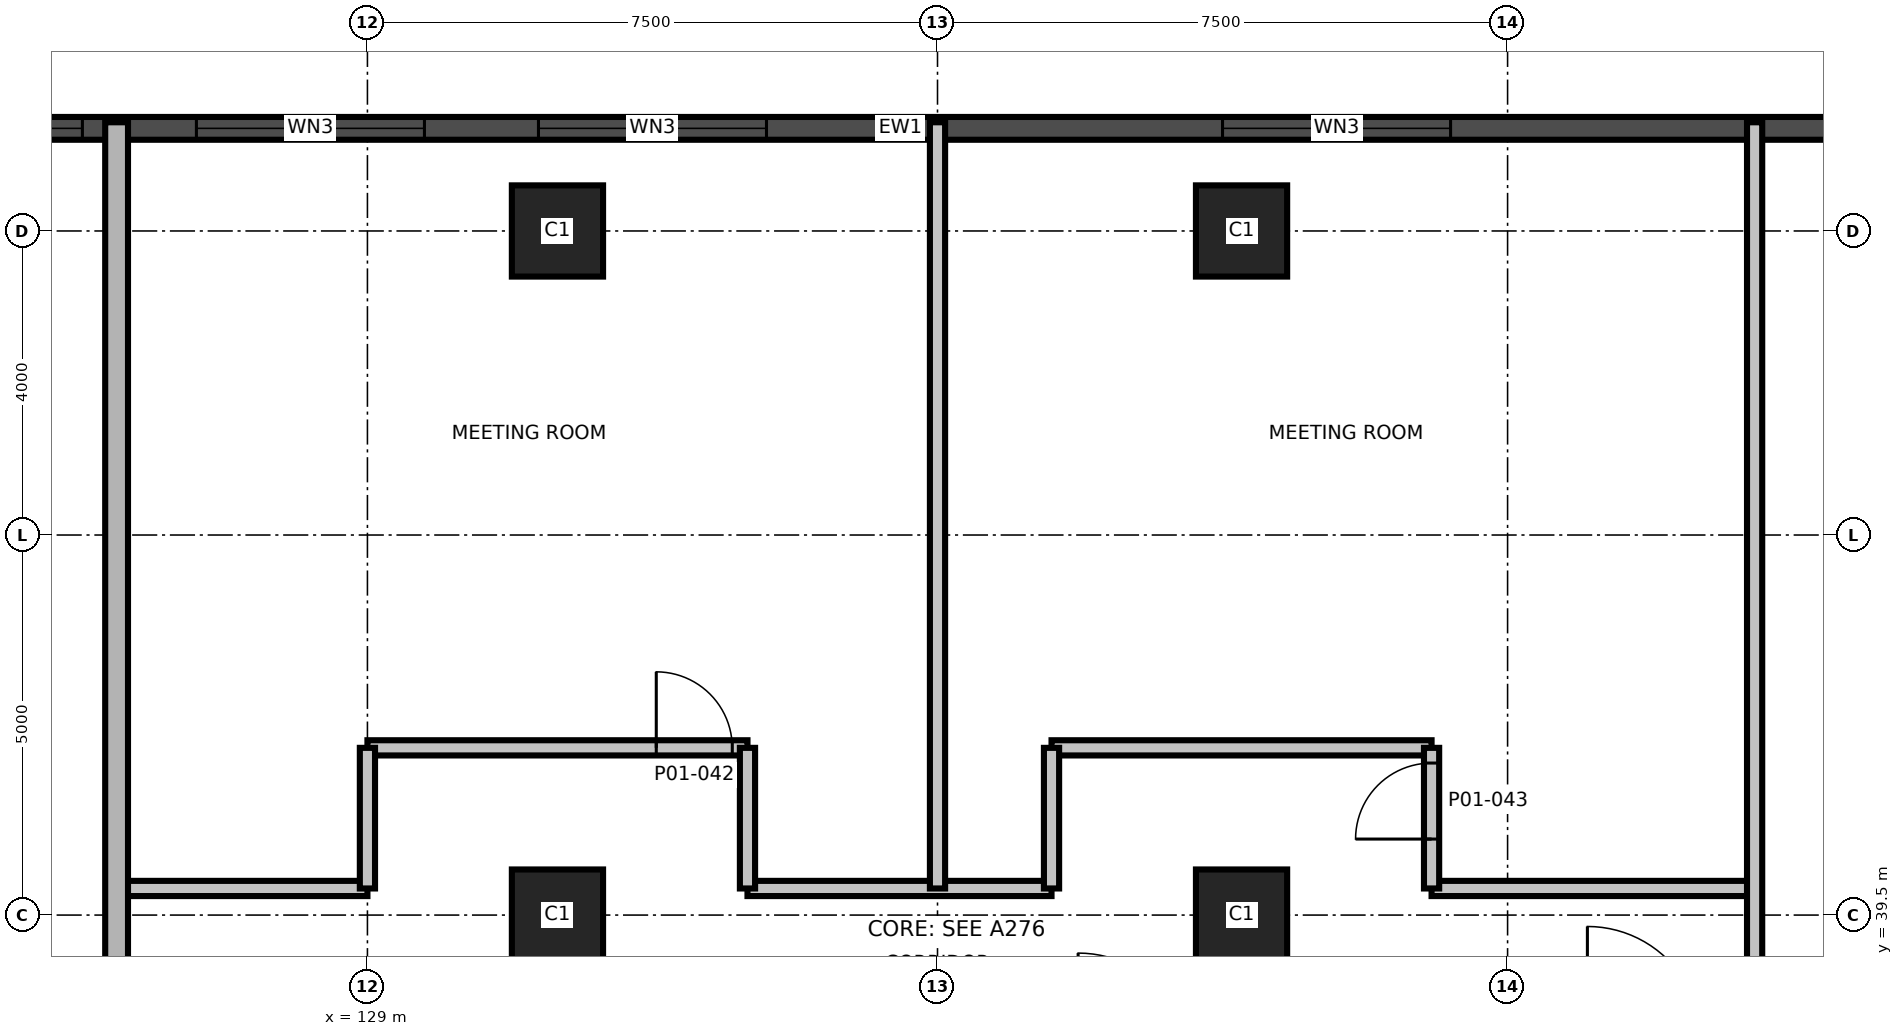
"""IFC4 building model, lengths in metres.
Left out: names, types, materials, properties, quantities, classifications, styles, units other than length and angle.
Written with IfcOpenShell. Run it as: python <this file> out.ifc"""

import sys

from ifc_helpers import new_model, si_unit, direction, frame, frame_2d, origin, origin_2d, place, context, subcontext, project, spatial, rectangle, extrude, element, fill, save


model = new_model("IFC4")
c1 = context("Model", 3, precision=1e-05, world=origin(), true_north=direction((0.0, 1.0)))
c2 = subcontext(c1, "Body", "Model", "MODEL_VIEW")
j1 = project(units=[si_unit("LENGTHUNIT", "METRE"), si_unit("PLANEANGLEUNIT", "RADIAN")], contexts=[c1])
p1 = place(None, origin())
s1 = spatial("IfcSite", under=j1, at=p1, CompositionType="ELEMENT")
p2 = place(p1, origin())
s2 = spatial("IfcBuilding", under=s1, at=p2, CompositionType="ELEMENT")
p3 = place(p2, frame((0.0, 0.0, 8.0)))
s3 = spatial("IfcBuildingStorey", under=s2, at=p3, CompositionType="ELEMENT", Elevation=8.0)
for number, where, z_axis, x_axis in (
    (1, (131.5, 39.5, 0.0), (0.0, 0.0, 1.0), (1.0, 0.0, 0.0)),
    (2, (140.5, 39.5, 0.0), (0.0, 0.0, 1.0), (1.0, 0.0, 0.0)),
    (3, (131.5, 48.5, 0.0), (0.0, 0.0, 1.0), (1.0, 0.0, 0.0)),
    (4, (140.5, 48.5, 0.0), (0.0, 0.0, 1.0), (1.0, 0.0, 0.0)),
):
    element("IfcColumn", number, at=place(p3, frame(where, z_axis=z_axis, x_axis=x_axis)), inside=s3, PredefinedType="COLUMN", context=c2, shape_type="SweptSolid", body=[
        extrude(rectangle(XDim=1.2, YDim=1.2, at=origin_2d()), origin(), (0.0, 0.0, 1.0), 5.5),
    ])
p4 = place(p3, frame((153.952, 49.85, 0.0), z_axis=(0.0, 0.0, 1.0), x_axis=(-1.0, 0.0, 0.0)))
e5 = element("IfcWall", 5, at=p4, inside=s3, PredefinedType="SOLIDWALL", context=c2, shape_type="SweptSolid", body=[
    extrude(rectangle(XDim=35.88, YDim=0.3, at=frame_2d((17.94, 0.0))), origin(), (0.0, 0.0, 1.0), 5.2),
])
p5 = place(p4, frame((1.226, 0.0, 0.9)))
e6 = element("IfcOpeningElement", 6, at=p5, cuts=e5, PredefinedType="OPENING", context=c2, shape_type="SweptSolid", body=[
    extrude(rectangle(XDim=3.0, YDim=2.4, at=frame_2d((1.5, 1.2))), frame((0.0, 0.16, 0.0), z_axis=(0.0, -1.0, 0.0), x_axis=(1.0, 0.0, 0.0)), (0.0, 0.0, 1.0), 0.32),
])
p6 = place(p4, frame((10.702, 0.0, 0.9)))
e7 = element("IfcOpeningElement", 7, at=p6, cuts=e5, PredefinedType="OPENING", context=c2, shape_type="SweptSolid", body=[
    extrude(rectangle(XDim=3.0, YDim=2.4, at=frame_2d((1.5, 1.2))), frame((0.0, 0.16, 0.0), z_axis=(0.0, -1.0, 0.0), x_axis=(1.0, 0.0, 0.0)), (0.0, 0.0, 1.0), 0.32),
])
p7 = place(p4, frame((19.702, 0.0, 0.9)))
e8 = element("IfcOpeningElement", 8, at=p7, cuts=e5, PredefinedType="OPENING", context=c2, shape_type="SweptSolid", body=[
    extrude(rectangle(XDim=3.0, YDim=2.4, at=frame_2d((1.5, 1.2))), frame((0.0, 0.16, 0.0), z_axis=(0.0, -1.0, 0.0), x_axis=(1.0, 0.0, 0.0)), (0.0, 0.0, 1.0), 0.32),
])
p8 = place(p4, frame((24.202, 0.0, 0.9)))
e9 = element("IfcOpeningElement", 9, at=p8, cuts=e5, PredefinedType="OPENING", context=c2, shape_type="SweptSolid", body=[
    extrude(rectangle(XDim=3.0, YDim=2.4, at=frame_2d((1.5, 1.2))), frame((0.0, 0.16, 0.0), z_axis=(0.0, -1.0, 0.0), x_axis=(1.0, 0.0, 0.0)), (0.0, 0.0, 1.0), 0.32),
])
p9 = place(p4, frame((28.702, 0.0, 0.9)))
e10 = element("IfcOpeningElement", 10, at=p9, cuts=e5, PredefinedType="OPENING", context=c2, shape_type="SweptSolid", body=[
    extrude(rectangle(XDim=3.0, YDim=2.4, at=frame_2d((1.5, 1.2))), frame((0.0, 0.16, 0.0), z_axis=(0.0, -1.0, 0.0), x_axis=(1.0, 0.0, 0.0)), (0.0, 0.0, 1.0), 0.32),
])
p10 = place(p3, frame((125.75, 39.85, 0.0), z_axis=(0.0, 0.0, 1.0), x_axis=(1.0, 0.0, 0.0)))
e11 = element("IfcWall", 11, at=p10, inside=s3, PredefinedType="PARTITIONING", context=c2, shape_type="SweptSolid", body=[
    extrude(rectangle(XDim=3.25, YDim=0.2, at=frame_2d((1.625, 0.0))), origin(), (0.0, 0.0, 1.0), 5.2),
])
p11 = place(p3, frame((134.0, 39.85, 0.0), z_axis=(0.0, 0.0, 1.0), x_axis=(1.0, 0.0, 0.0)))
e12 = element("IfcWall", 12, at=p11, inside=s3, PredefinedType="PARTITIONING", context=c2, shape_type="SweptSolid", body=[
    extrude(rectangle(XDim=4.0, YDim=0.2, at=frame_2d((2.0, 0.0))), origin(), (0.0, 0.0, 1.0), 5.2),
])
p12 = place(p3, frame((143.0, 39.85, 0.0), z_axis=(0.0, 0.0, 1.0), x_axis=(1.0, 0.0, 0.0)))
e13 = element("IfcWall", 13, at=p12, inside=s3, PredefinedType="PARTITIONING", context=c2, shape_type="SweptSolid", body=[
    extrude(rectangle(XDim=4.25, YDim=0.2, at=frame_2d((2.125, 0.0))), origin(), (0.0, 0.0, 1.0), 5.2),
])
p13 = place(p3, frame((129.0, 41.7, 0.0), z_axis=(0.0, 0.0, 1.0), x_axis=(1.0, 0.0, 0.0)))
e14 = element("IfcWall", 14, at=p13, inside=s3, PredefinedType="PARTITIONING", context=c2, shape_type="SweptSolid", body=[
    extrude(rectangle(XDim=5.0, YDim=0.2, at=frame_2d((2.5, 0.0))), origin(), (0.0, 0.0, 1.0), 5.2),
])
p14 = place(p13, frame((3.8, 0.0, 0.0)))
e15 = element("IfcOpeningElement", 15, at=p14, cuts=e14, PredefinedType="OPENING", context=c2, shape_type="SweptSolid", body=[
    extrude(rectangle(XDim=1.0, YDim=2.1, at=frame_2d((0.5, 1.05))), frame((0.0, 0.11, 0.0), z_axis=(0.0, -1.0, 0.0), x_axis=(1.0, 0.0, 0.0)), (0.0, 0.0, 1.0), 0.22),
])
p15 = place(p3, frame((138.0, 41.7, 0.0), z_axis=(0.0, 0.0, 1.0), x_axis=(1.0, 0.0, 0.0)))
e16 = element("IfcWall", 16, at=p15, inside=s3, PredefinedType="PARTITIONING", context=c2, shape_type="SweptSolid", body=[
    extrude(rectangle(XDim=5.0, YDim=0.2, at=frame_2d((2.5, 0.0))), origin(), (0.0, 0.0, 1.0), 5.2),
])
p16 = place(p3, frame((125.7, 11.07, 0.0), z_axis=(0.0, 0.0, 1.0), x_axis=(0.0, 1.0, 0.0)))
e17 = element("IfcWall", 17, at=p16, inside=s3, PredefinedType="SHEAR", context=c2, shape_type="SweptSolid", body=[
    extrude(rectangle(XDim=38.86, YDim=0.3, at=frame_2d((19.43, 0.0))), origin(), (0.0, 0.0, 1.0), 5.2),
])
p17 = place(p16, frame((14.194, 0.0, 0.0)))
e18 = element("IfcOpeningElement", 18, at=p17, cuts=e17, PredefinedType="OPENING", context=c2, shape_type="SweptSolid", body=[
    extrude(rectangle(XDim=1.0, YDim=2.1, at=frame_2d((0.5, 1.05))), frame((0.0, 0.16, 0.0), z_axis=(0.0, -1.0, 0.0), x_axis=(1.0, 0.0, 0.0)), (0.0, 0.0, 1.0), 0.32),
])
for number, where, z_axis, x_axis in (
    (19, (129.0, 39.85, 0.0), (0.0, 0.0, 1.0), (0.0, 1.0, 0.0)),
    (20, (134.0, 39.85, 0.0), (0.0, 0.0, 1.0), (0.0, 1.0, 0.0)),
):
    element("IfcWall", number, at=place(p3, frame(where, z_axis=z_axis, x_axis=x_axis)), inside=s3, PredefinedType="PARTITIONING", context=c2, shape_type="SweptSolid", body=[
        extrude(rectangle(XDim=1.85, YDim=0.2, at=frame_2d((0.925, 0.0))), origin(), (0.0, 0.0, 1.0), 5.2),
    ])
p18 = place(p3, frame((136.5, 39.85, 0.0), z_axis=(0.0, 0.0, 1.0), x_axis=(0.0, 1.0, 0.0)))
e21 = element("IfcWall", 21, at=p18, inside=s3, PredefinedType="PARTITIONING", context=c2, shape_type="SweptSolid", body=[
    extrude(rectangle(XDim=10.08, YDim=0.2, at=frame_2d((5.04, 0.0))), origin(), (0.0, 0.0, 1.0), 5.2),
])
p19 = place(p3, frame((138.0, 39.85, 0.0), z_axis=(0.0, 0.0, 1.0), x_axis=(0.0, 1.0, 0.0)))
e22 = element("IfcWall", 22, at=p19, inside=s3, PredefinedType="PARTITIONING", context=c2, shape_type="SweptSolid", body=[
    extrude(rectangle(XDim=1.85, YDim=0.2, at=frame_2d((0.925, 0.0))), origin(), (0.0, 0.0, 1.0), 5.2),
])
p20 = place(p3, frame((143.0, 39.85, 0.0), z_axis=(0.0, 0.0, 1.0), x_axis=(0.0, 1.0, 0.0)))
e23 = element("IfcWall", 23, at=p20, inside=s3, PredefinedType="PARTITIONING", context=c2, shape_type="SweptSolid", body=[
    extrude(rectangle(XDim=1.85, YDim=0.2, at=frame_2d((0.925, 0.0))), origin(), (0.0, 0.0, 1.0), 5.2),
])
p21 = place(p20, frame((0.65, 0.0, 0.0)))
e24 = element("IfcOpeningElement", 24, at=p21, cuts=e23, PredefinedType="OPENING", context=c2, shape_type="SweptSolid", body=[
    extrude(rectangle(XDim=1.0, YDim=2.1, at=frame_2d((0.5, 1.05))), frame((0.0, 0.11, 0.0), z_axis=(0.0, -1.0, 0.0), x_axis=(1.0, 0.0, 0.0)), (0.0, 0.0, 1.0), 0.22),
])
p22 = place(p3, frame((147.25, 11.07, 0.0), z_axis=(0.0, 0.0, 1.0), x_axis=(0.0, 1.0, 0.0)))
e25 = element("IfcWall", 25, at=p22, inside=s3, PredefinedType="PARTITIONING", context=c2, shape_type="SweptSolid", body=[
    extrude(rectangle(XDim=38.86, YDim=0.2, at=frame_2d((19.43, 0.0))), origin(), (0.0, 0.0, 1.0), 5.2),
])
p23 = place(p22, frame((18.18, 0.0, 0.0)))
e26 = element("IfcOpeningElement", 26, at=p23, cuts=e25, PredefinedType="OPENING", context=c2, shape_type="SweptSolid", body=[
    extrude(rectangle(XDim=1.5, YDim=2.1, at=frame_2d((0.75, 1.05))), frame((0.0, 0.11, 0.0), z_axis=(0.0, -1.0, 0.0), x_axis=(1.0, 0.0, 0.0)), (0.0, 0.0, 1.0), 0.22),
])
p24 = place(p6, origin())
e27 = element("IfcWindow", 27, at=p24, inside=s3, PartitioningType="SINGLE_PANEL", PredefinedType="WINDOW", context=c2, shape_type="SweptSolid", body=[
    extrude(rectangle(XDim=3.0, YDim=2.4, at=frame_2d((1.5, 1.2))), frame((0.0, 0.03, 0.0), z_axis=(0.0, -1.0, 0.0), x_axis=(1.0, 0.0, 0.0)), (0.0, 0.0, 1.0), 0.06),
])
fill(e7, e27)
p25 = place(p7, origin())
e28 = element("IfcWindow", 28, at=p25, inside=s3, PartitioningType="SINGLE_PANEL", PredefinedType="WINDOW", context=c2, shape_type="SweptSolid", body=[
    extrude(rectangle(XDim=3.0, YDim=2.4, at=frame_2d((1.5, 1.2))), frame((0.0, 0.03, 0.0), z_axis=(0.0, -1.0, 0.0), x_axis=(1.0, 0.0, 0.0)), (0.0, 0.0, 1.0), 0.06),
])
fill(e8, e28)
p26 = place(p8, origin())
e29 = element("IfcWindow", 29, at=p26, inside=s3, PartitioningType="SINGLE_PANEL", PredefinedType="WINDOW", context=c2, shape_type="SweptSolid", body=[
    extrude(rectangle(XDim=3.0, YDim=2.4, at=frame_2d((1.5, 1.2))), frame((0.0, 0.03, 0.0), z_axis=(0.0, -1.0, 0.0), x_axis=(1.0, 0.0, 0.0)), (0.0, 0.0, 1.0), 0.06),
])
fill(e9, e29)
p27 = place(p9, origin())
e30 = element("IfcWindow", 30, at=p27, inside=s3, PartitioningType="SINGLE_PANEL", PredefinedType="WINDOW", context=c2, shape_type="SweptSolid", body=[
    extrude(rectangle(XDim=3.0, YDim=2.4, at=frame_2d((1.5, 1.2))), frame((0.0, 0.03, 0.0), z_axis=(0.0, -1.0, 0.0), x_axis=(1.0, 0.0, 0.0)), (0.0, 0.0, 1.0), 0.06),
])
fill(e10, e30)
p28 = place(p14, origin())
e31 = element("IfcDoor", 31, at=p28, inside=s3, OperationType="SINGLE_SWING_RIGHT", PredefinedType="DOOR", context=c2, shape_type="SweptSolid", body=[
    extrude(rectangle(XDim=1.0, YDim=2.1, at=frame_2d((0.5, 1.05))), frame((0.0, 0.025, 0.0), z_axis=(0.0, -1.0, 0.0), x_axis=(1.0, 0.0, 0.0)), (0.0, 0.0, 1.0), 0.05),
])
fill(e15, e31)
p29 = place(p21, origin())
e32 = element("IfcDoor", 32, at=p29, inside=s3, OperationType="SINGLE_SWING_LEFT", PredefinedType="DOOR", context=c2, shape_type="SweptSolid", body=[
    extrude(rectangle(XDim=1.0, YDim=2.1, at=frame_2d((0.5, 1.05))), frame((0.0, 0.025, 0.0), z_axis=(0.0, -1.0, 0.0), x_axis=(1.0, 0.0, 0.0)), (0.0, 0.0, 1.0), 0.05),
])
fill(e24, e32)
save(model, sys.argv[1])
